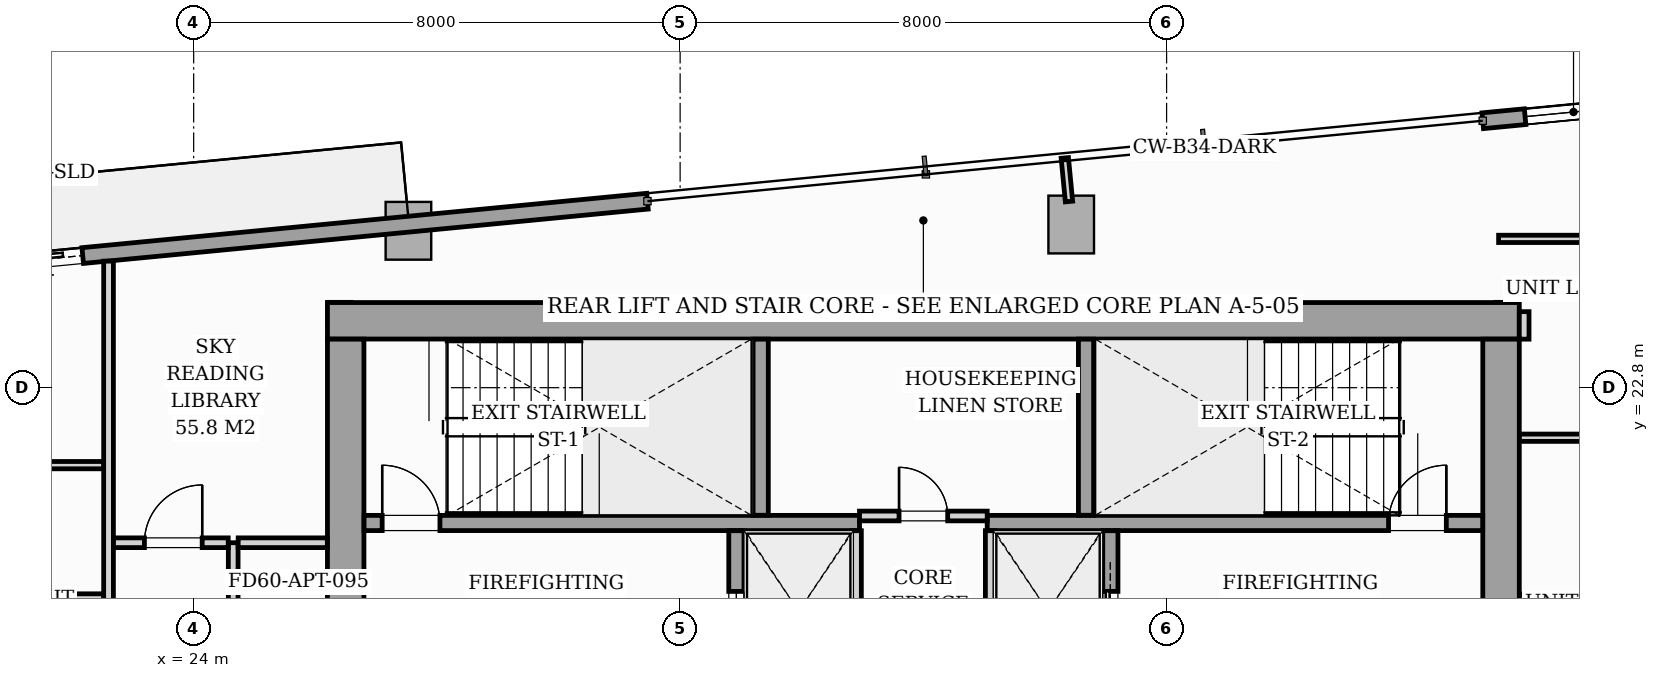
"""IFC4 building model, lengths in metres.
Left out: names, types, materials, properties, quantities, classifications, styles, units other than length and angle.
Written with IfcOpenShell. Run it as: python <this file> out.ifc"""

import sys

from ifc_helpers import new_model, si_unit, direction, frame, frame_2d, origin, origin_2d, place, context, subcontext, project, spatial, rectangle, i_section, extrude, source, transform, mapped, element, fill, save


model = new_model("IFC4")
c1 = context("Model", 3, precision=1e-05, world=origin(), true_north=direction((0.0, 1.0)))
c2 = subcontext(c1, "Body", "Model", "MODEL_VIEW")
j1 = project(units=[si_unit("LENGTHUNIT", "METRE"), si_unit("PLANEANGLEUNIT", "RADIAN")], contexts=[c1])
p1 = place(None, origin())
s1 = spatial("IfcSite", under=j1, at=p1, CompositionType="ELEMENT")
p2 = place(p1, origin())
s2 = spatial("IfcBuilding", under=s1, at=p2, CompositionType="ELEMENT")
p3 = place(p2, frame((0.0, 0.0, 176.2)))
s3 = spatial("IfcBuildingStorey", under=s2, at=p3, CompositionType="ELEMENT", Elevation=176.2)
m1 = source(origin(), c2, "Body", "SweptSolid", [
    extrude(i_section(OverallWidth=0.416, OverallDepth=0.446, WebThickness=0.039, FlangeThickness=0.063, FilletRadius=0.018, at=origin_2d()), origin(), (0.0, 0.0, 1.0), 3.196),
])
for number, where, z_axis, x_axis in (
    (1, (26.4, 24.0, 0.002), (0.0, 0.0, 1.0), (1.0, 0.0, 0.0)),
    (2, (33.12, 24.0, 0.002), (0.0, 0.0, 1.0), (1.0, 0.0, 0.0)),
    (3, (38.88, 24.0, 0.002), (0.0, 0.0, 1.0), (1.0, 0.0, 0.0)),
    (4, (45.6, 24.0, 0.002), (0.0, 0.0, 1.0), (1.0, 0.0, 0.0)),
):
    element("IfcColumn", number, at=place(p3, frame(where, z_axis=z_axis, x_axis=x_axis)), inside=s3, PredefinedType="PILASTER", context=c2, shape_type="MappedRepresentation", body=[
        mapped(m1, transform((0.0, 0.0, 0.0), scale=1.0)),
    ])
m2 = source(origin(), c2, "Body", "SweptSolid", [
    extrude(rectangle(XDim=0.75, YDim=0.95, at=origin_2d()), origin(), (0.0, 0.0, 1.0), 3.196),
])
for number, where, z_axis, x_axis in (
    (5, (27.532, 25.38, 0.002), (0.0, 0.0, 1.0), (0.995, 0.096, 0.0)),
    (6, (38.431, 25.483, 0.002), (0.0, 0.0, 1.0), (0.995, 0.096, 0.0)),
):
    element("IfcColumn", number, at=place(p3, frame(where, z_axis=z_axis, x_axis=x_axis)), inside=s3, PredefinedType="COLUMN", context=c2, shape_type="MappedRepresentation", body=[
        mapped(m2, transform((0.0, 0.0, 0.0), scale=1.0)),
    ])
p4 = place(p3, frame((15.437, 24.324, 0.0), z_axis=(0.0, 0.0, 1.0), x_axis=(0.995395627913, 0.095851676732, 0.0)))
e7 = element("IfcWall", 7, at=p4, inside=s3, PredefinedType="STANDARD", context=c2, shape_type="SweptSolid", body=[
    extrude(rectangle(XDim=16.1, YDim=0.26, at=frame_2d((8.05, 0.0))), origin(), (0.0, 0.0, 1.0), 2.94),
])
p5 = place(p4, frame((4.97, 0.0, 0.0)))
e8 = element("IfcOpeningElement", 8, at=p5, cuts=e7, PredefinedType="OPENING", context=c2, shape_type="SweptSolid", body=[
    extrude(rectangle(XDim=1.8, YDim=2.06, at=frame_2d((0.9, 1.03))), frame((0.0, 0.14, 0.0), z_axis=(0.0, -1.0, 0.0), x_axis=(1.0, 0.0, 0.0)), (0.0, 0.0, 1.0), 0.28),
])
p6 = place(p4, frame((2.05, 0.0, 0.65)))
e9 = element("IfcOpeningElement", 9, at=p6, cuts=e7, PredefinedType="OPENING", context=c2, shape_type="SweptSolid", body=[
    extrude(rectangle(XDim=1.6, YDim=1.5, at=frame_2d((0.8, 0.75))), frame((0.0, 0.14, 0.0), z_axis=(0.0, -1.0, 0.0), x_axis=(1.0, 0.0, 0.0)), (0.0, 0.0, 1.0), 0.28),
])
p7 = place(p3, frame((45.199, 27.19, 0.0), z_axis=(0.0, 0.0, 1.0), x_axis=(0.995397074604, 0.095836652014, 0.0)))
e10 = element("IfcWall", 10, at=p7, inside=s3, PredefinedType="STANDARD", context=c2, shape_type="SweptSolid", body=[
    extrude(rectangle(XDim=16.1, YDim=0.26, at=frame_2d((8.05, 0.0))), origin(), (0.0, 0.0, 1.0), 2.94),
])
p8 = place(p7, frame((10.13, 0.0, 0.0)))
e11 = element("IfcOpeningElement", 11, at=p8, cuts=e10, PredefinedType="OPENING", context=c2, shape_type="SweptSolid", body=[
    extrude(rectangle(XDim=1.8, YDim=2.06, at=frame_2d((0.9, 1.03))), frame((0.0, 0.14, 0.0), z_axis=(0.0, -1.0, 0.0), x_axis=(1.0, 0.0, 0.0)), (0.0, 0.0, 1.0), 0.28),
])
p9 = place(p7, frame((0.7, 0.0, 0.65)))
e12 = element("IfcOpeningElement", 12, at=p9, cuts=e10, PredefinedType="OPENING", context=c2, shape_type="SweptSolid", body=[
    extrude(rectangle(XDim=1.6, YDim=1.5, at=frame_2d((0.8, 0.75))), frame((0.0, 0.14, 0.0), z_axis=(0.0, -1.0, 0.0), x_axis=(1.0, 0.0, 0.0)), (0.0, 0.0, 1.0), 0.28),
])
p10 = place(p3, frame((26.2, 23.9, 0.0), z_axis=(0.0, 0.0, 1.0), x_axis=(1.0, 0.0, 0.0)))
e13 = element("IfcWall", 13, at=p10, inside=s3, PredefinedType="SHEAR", context=c2, shape_type="SweptSolid", body=[
    extrude(rectangle(XDim=19.6, YDim=0.6, at=frame_2d((9.8, 0.0))), origin(), (0.0, 0.0, 1.0), 3.2),
])
for number, where, z_axis, x_axis in (
    (14, (26.5, 17.802, 0.0), (0.0, 0.0, 1.0), (0.0, 1.0, 0.0)),
    (15, (45.5, 17.802, 0.0), (0.0, 0.0, 1.0), (0.0, 1.0, 0.0)),
):
    element("IfcWall", number, at=place(p3, frame(where, z_axis=z_axis, x_axis=x_axis)), inside=s3, PredefinedType="SHEAR", context=c2, shape_type="SweptSolid", body=[
        extrude(rectangle(XDim=5.796, YDim=0.6, at=frame_2d((2.898, 0.0))), origin(), (0.0, 0.0, 1.0), 3.2),
    ])
p11 = place(p3, frame((26.802, 20.575, 0.0), z_axis=(0.0, 0.0, 1.0), x_axis=(1.0, 0.0, 0.0)))
e16 = element("IfcWall", 16, at=p11, inside=s3, PredefinedType="SOLIDWALL", context=c2, shape_type="SweptSolid", body=[
    extrude(rectangle(XDim=8.148, YDim=0.25, at=frame_2d((4.074, 0.0))), origin(), (0.0, 0.0, 1.0), 3.2),
])
p12 = place(p11, frame((0.298, 0.0, 0.0)))
e17 = element("IfcOpeningElement", 17, at=p12, cuts=e16, PredefinedType="OPENING", context=c2, shape_type="SweptSolid", body=[
    extrude(rectangle(XDim=0.95, YDim=2.06, at=frame_2d((0.475, 1.03))), frame((0.0, 0.135, 0.0), z_axis=(0.0, -1.0, 0.0), x_axis=(1.0, 0.0, 0.0)), (0.0, 0.0, 1.0), 0.27),
])
p13 = place(p3, frame((37.05, 20.575, 0.0), z_axis=(0.0, 0.0, 1.0), x_axis=(1.0, 0.0, 0.0)))
e18 = element("IfcWall", 18, at=p13, inside=s3, PredefinedType="SOLIDWALL", context=c2, shape_type="SweptSolid", body=[
    extrude(rectangle(XDim=8.148, YDim=0.25, at=frame_2d((4.074, 0.0))), origin(), (0.0, 0.0, 1.0), 3.2),
])
p14 = place(p13, frame((6.6, 0.0, 0.0)))
e19 = element("IfcOpeningElement", 19, at=p14, cuts=e18, PredefinedType="OPENING", context=c2, shape_type="SweptSolid", body=[
    extrude(rectangle(XDim=0.95, YDim=2.06, at=frame_2d((0.475, 1.03))), frame((0.0, 0.135, 0.0), z_axis=(0.0, -1.0, 0.0), x_axis=(1.0, 0.0, 0.0)), (0.0, 0.0, 1.0), 0.27),
])
for number, where, z_axis, x_axis in (
    (20, (33.325, 20.702, 0.0), (0.0, 0.0, 1.0), (0.0, 1.0, 0.0)),
    (21, (38.675, 20.702, 0.0), (0.0, 0.0, 1.0), (0.0, 1.0, 0.0)),
):
    element("IfcWall", number, at=place(p3, frame(where, z_axis=z_axis, x_axis=x_axis)), inside=s3, PredefinedType="SOLIDWALL", context=c2, shape_type="SweptSolid", body=[
        extrude(rectangle(XDim=2.896, YDim=0.25, at=frame_2d((1.448, 0.0))), origin(), (0.0, 0.0, 1.0), 3.2),
    ])
p15 = place(p3, frame((32.925, 17.802, 0.0), z_axis=(0.0, 0.0, 1.0), x_axis=(0.0, 1.0, 0.0)))
e22 = element("IfcWall", 22, at=p15, inside=s3, PredefinedType="SOLIDWALL", context=c2, shape_type="SweptSolid", body=[
    extrude(rectangle(XDim=2.646, YDim=0.25, at=frame_2d((1.323, 0.0))), origin(), (0.0, 0.0, 1.0), 3.2),
])
p16 = place(p15, frame((0.548, 0.0, 0.0)))
e23 = element("IfcOpeningElement", 23, at=p16, cuts=e22, PredefinedType="OPENING", context=c2, shape_type="SweptSolid", body=[
    extrude(rectangle(XDim=1.1, YDim=2.08, at=frame_2d((0.55, 1.04))), frame((0.0, 0.135, 0.0), z_axis=(0.0, -1.0, 0.0), x_axis=(1.0, 0.0, 0.0)), (0.0, 0.0, 1.0), 0.27),
])
for number, where, z_axis, x_axis in (
    (24, (34.9, 17.802, 0.0), (0.0, 0.0, 1.0), (0.0, 1.0, 0.0)),
    (25, (37.1, 17.802, 0.0), (0.0, 0.0, 1.0), (0.0, 1.0, 0.0)),
):
    element("IfcWall", number, at=place(p3, frame(where, z_axis=z_axis, x_axis=x_axis)), inside=s3, PredefinedType="PARTITIONING", context=c2, shape_type="SweptSolid", body=[
        extrude(rectangle(XDim=2.646, YDim=0.16, at=frame_2d((1.323, 0.0))), origin(), (0.0, 0.0, 1.0), 2.94),
    ])
p17 = place(p3, frame((39.075, 17.802, 0.0), z_axis=(0.0, 0.0, 1.0), x_axis=(0.0, 1.0, 0.0)))
e26 = element("IfcWall", 26, at=p17, inside=s3, PredefinedType="SOLIDWALL", context=c2, shape_type="SweptSolid", body=[
    extrude(rectangle(XDim=2.646, YDim=0.25, at=frame_2d((1.323, 0.0))), origin(), (0.0, 0.0, 1.0), 3.2),
])
p18 = place(p17, frame((0.548, 0.0, 0.0)))
e27 = element("IfcOpeningElement", 27, at=p18, cuts=e26, PredefinedType="OPENING", context=c2, shape_type="SweptSolid", body=[
    extrude(rectangle(XDim=1.1, YDim=2.08, at=frame_2d((0.55, 1.04))), frame((0.0, 0.135, 0.0), z_axis=(0.0, -1.0, 0.0), x_axis=(1.0, 0.0, 0.0)), (0.0, 0.0, 1.0), 0.27),
])
p19 = place(p3, frame((34.95, 20.69, 0.0), z_axis=(0.0, 0.0, 1.0), x_axis=(1.0, 0.0, 0.0)))
e28 = element("IfcWall", 28, at=p19, inside=s3, PredefinedType="PARTITIONING", context=c2, shape_type="SweptSolid", body=[
    extrude(rectangle(XDim=2.1, YDim=0.16, at=frame_2d((1.05, 0.0))), origin(), (0.0, 0.0, 1.0), 2.94),
])
p20 = place(p19, frame((0.65, 0.0, 0.0)))
e29 = element("IfcOpeningElement", 29, at=p20, cuts=e28, PredefinedType="OPENING", context=c2, shape_type="SweptSolid", body=[
    extrude(rectangle(XDim=0.8, YDim=2.05, at=frame_2d((0.4, 1.025))), frame((0.0, 0.09, 0.0), z_axis=(0.0, -1.0, 0.0), x_axis=(1.0, 0.0, 0.0)), (0.0, 0.0, 1.0), 0.18),
])
p21 = place(p3, frame((22.6, 13.232, 0.0), z_axis=(0.0, 0.0, 1.0), x_axis=(0.0, 1.0, 0.0)))
e30 = element("IfcWall", 30, at=p21, inside=s3, PredefinedType="PARTITIONING", context=c2, shape_type="SweptSolid", body=[
    extrude(rectangle(XDim=11.649, YDim=0.16, at=frame_2d((5.824, 0.0))), origin(), (0.0, 0.0, 1.0), 2.94),
])
p22 = place(p21, frame((0.493, 0.0, 0.0)))
e31 = element("IfcOpeningElement", 31, at=p22, cuts=e30, PredefinedType="OPENING", context=c2, shape_type="SweptSolid", body=[
    extrude(rectangle(XDim=0.95, YDim=2.06, at=frame_2d((0.475, 1.03))), frame((0.0, 0.09, 0.0), z_axis=(0.0, -1.0, 0.0), x_axis=(1.0, 0.0, 0.0)), (0.0, 0.0, 1.0), 0.18),
])
p23 = place(p3, frame((45.88, 23.598, 0.0), z_axis=(0.0, 0.0, 1.0), x_axis=(0.0, 1.0, 0.0)))
e32 = element("IfcWall", 32, at=p23, inside=s3, PredefinedType="PARTITIONING", context=c2, shape_type="SweptSolid", body=[
    extrude(rectangle(XDim=0.452, YDim=0.16, at=frame_2d((0.226, 0.0))), origin(), (0.0, 0.0, 1.0), 2.94),
])
p24 = place(p3, frame((20.262, 19.35, 0.0), z_axis=(0.0, 0.0, 1.0), x_axis=(1.0, 0.0, 0.0)))
e33 = element("IfcWall", 33, at=p24, inside=s3, PredefinedType="PARTITIONING", context=c2, shape_type="SweptSolid", body=[
    extrude(rectangle(XDim=2.256, YDim=0.12, at=frame_2d((1.128, 0.0))), origin(), (0.0, 0.0, 1.0), 2.94),
])
p25 = place(p3, frame((14.53, 21.526, 0.0), z_axis=(0.0, 0.0, 1.0), x_axis=(1.0, 0.0, 0.0)))
e34 = element("IfcWall", 34, at=p25, inside=s3, PredefinedType="PARTITIONING", context=c2, shape_type="SweptSolid", body=[
    extrude(rectangle(XDim=7.988, YDim=0.12, at=frame_2d((3.994, 0.0))), origin(), (0.0, 0.0, 1.0), 2.94),
])
p26 = place(p25, frame((2.925, 0.0, 0.0)))
e35 = element("IfcOpeningElement", 35, at=p26, cuts=e34, PredefinedType="OPENING", context=c2, shape_type="SweptSolid", body=[
    extrude(rectangle(XDim=0.85, YDim=2.05, at=frame_2d((0.425, 1.025))), frame((0.0, 0.07, 0.0), z_axis=(0.0, -1.0, 0.0), x_axis=(1.0, 0.0, 0.0)), (0.0, 0.0, 1.0), 0.14),
])
p27 = place(p3, frame((45.802, 19.35, 0.0), z_axis=(0.0, 0.0, 1.0), x_axis=(1.0, 0.0, 0.0)))
e36 = element("IfcWall", 36, at=p27, inside=s3, PredefinedType="PARTITIONING", context=c2, shape_type="SweptSolid", body=[
    extrude(rectangle(XDim=2.416, YDim=0.12, at=frame_2d((1.208, 0.0))), origin(), (0.0, 0.0, 1.0), 2.94),
])
p28 = place(p3, frame((45.46, 25.247, 0.0), z_axis=(0.0, 0.0, 1.0), x_axis=(1.0, 0.0, 0.0)))
e37 = element("IfcWall", 37, at=p28, inside=s3, PredefinedType="PARTITIONING", context=c2, shape_type="SweptSolid", body=[
    extrude(rectangle(XDim=9.461, YDim=0.12, at=frame_2d((4.73, 0.0))), origin(), (0.0, 0.0, 1.0), 2.94),
])
p29 = place(p28, frame((4.826, 0.0, 0.0)))
e38 = element("IfcOpeningElement", 38, at=p29, cuts=e37, PredefinedType="OPENING", context=c2, shape_type="SweptSolid", body=[
    extrude(rectangle(XDim=0.85, YDim=2.05, at=frame_2d((0.425, 1.025))), frame((0.0, 0.07, 0.0), z_axis=(0.0, -1.0, 0.0), x_axis=(1.0, 0.0, 0.0)), (0.0, 0.0, 1.0), 0.14),
])
p30 = place(p3, frame((45.802, 21.977, 0.0), z_axis=(0.0, 0.0, 1.0), x_axis=(1.0, 0.0, 0.0)))
e39 = element("IfcWall", 39, at=p30, inside=s3, PredefinedType="PARTITIONING", context=c2, shape_type="SweptSolid", body=[
    extrude(rectangle(XDim=18.504, YDim=0.12, at=frame_2d((9.252, 0.0))), origin(), (0.0, 0.0, 1.0), 2.94),
])
p31 = place(p30, frame((8.913, 0.0, 0.0)))
e40 = element("IfcOpeningElement", 40, at=p31, cuts=e39, PredefinedType="OPENING", context=c2, shape_type="SweptSolid", body=[
    extrude(rectangle(XDim=0.85, YDim=2.05, at=frame_2d((0.425, 1.025))), frame((0.0, 0.07, 0.0), z_axis=(0.0, -1.0, 0.0), x_axis=(1.0, 0.0, 0.0)), (0.0, 0.0, 1.0), 0.14),
])
p32 = place(p3, frame((24.65, 14.66, 0.0), z_axis=(0.0, 0.0, 1.0), x_axis=(0.0, 1.0, 0.0)))
e41 = element("IfcWall", 41, at=p32, inside=s3, PredefinedType="PARTITIONING", context=c2, shape_type="SweptSolid", body=[
    extrude(rectangle(XDim=5.59, YDim=0.16, at=frame_2d((2.795, 0.0))), origin(), (0.0, 0.0, 1.0), 2.94),
])
p33 = place(p32, frame((3.54, 0.0, 0.0)))
e42 = element("IfcOpeningElement", 42, at=p33, cuts=e41, PredefinedType="OPENING", context=c2, shape_type="SweptSolid", body=[
    extrude(rectangle(XDim=0.95, YDim=2.06, at=frame_2d((0.475, 1.03))), frame((0.0, 0.09, 0.0), z_axis=(0.0, -1.0, 0.0), x_axis=(1.0, 0.0, 0.0)), (0.0, 0.0, 1.0), 0.18),
])
p34 = place(p3, frame((22.682, 20.25, 0.0), z_axis=(0.0, 0.0, 1.0), x_axis=(1.0, 0.0, 0.0)))
e43 = element("IfcWall", 43, at=p34, inside=s3, PredefinedType="PARTITIONING", context=c2, shape_type="SweptSolid", body=[
    extrude(rectangle(XDim=1.886, YDim=0.16, at=frame_2d((0.943, 0.0))), origin(), (0.0, 0.0, 1.0), 2.94),
])
p35 = place(p34, frame((0.508, 0.0, 0.0)))
e44 = element("IfcOpeningElement", 44, at=p35, cuts=e43, PredefinedType="OPENING", context=c2, shape_type="SweptSolid", body=[
    extrude(rectangle(XDim=0.95, YDim=2.06, at=frame_2d((0.475, 1.03))), frame((0.0, 0.09, 0.0), z_axis=(0.0, -1.0, 0.0), x_axis=(1.0, 0.0, 0.0)), (0.0, 0.0, 1.0), 0.18),
])
p36 = place(p3, frame((24.732, 20.25, 0.0), z_axis=(0.0, 0.0, 1.0), x_axis=(1.0, 0.0, 0.0)))
e45 = element("IfcWall", 45, at=p36, inside=s3, PredefinedType="PARTITIONING", context=c2, shape_type="SweptSolid", body=[
    extrude(rectangle(XDim=1.466, YDim=0.16, at=frame_2d((0.733, 0.0))), origin(), (0.0, 0.0, 1.0), 2.94),
])
p37 = place(p3, frame((38.395, 25.861, 0.0), z_axis=(0.0, 0.0, 1.0), x_axis=(-0.095977354523, 0.995383517755, 0.0)))
e46 = element("IfcWall", 46, at=p37, inside=s3, PredefinedType="PARTITIONING", context=c2, shape_type="SweptSolid", body=[
    extrude(rectangle(XDim=0.72, YDim=0.12, at=frame_2d((0.36, 0.0))), origin(), (0.0, 0.0, 1.0), 2.94),
])
m3 = source(origin(), c2, "Body", "SweptSolid", [
    extrude(rectangle(XDim=1.8, YDim=2.06, at=frame_2d((0.9, 1.03))), frame((0.0, 0.025, 0.0), z_axis=(0.0, -1.0, 0.0), x_axis=(1.0, 0.0, 0.0)), (0.0, 0.0, 1.0), 0.05),
])
p38 = place(p5, origin())
e47 = element("IfcDoor", 47, at=p38, inside=s3, OperationType="SLIDING_TO_LEFT", PredefinedType="DOOR", context=c2, shape_type="MappedRepresentation", body=[
    mapped(m3, transform((0.0, 0.0, 0.0), scale=1.0)),
])
fill(e8, e47)
m4 = source(origin(), c2, "Body", "SweptSolid", [
    extrude(rectangle(XDim=1.6, YDim=1.5, at=frame_2d((0.8, 0.75))), frame((0.0, 0.03, 0.0), z_axis=(0.0, -1.0, 0.0), x_axis=(1.0, 0.0, 0.0)), (0.0, 0.0, 1.0), 0.06),
])
p39 = place(p9, origin())
e48 = element("IfcWindow", 48, at=p39, inside=s3, PartitioningType="SINGLE_PANEL", PredefinedType="WINDOW", context=c2, shape_type="MappedRepresentation", body=[
    mapped(m4, transform((0.0, 0.0, 0.0), scale=1.0)),
])
fill(e12, e48)
m5 = source(origin(), c2, "Body", "SweptSolid", [
    extrude(rectangle(XDim=0.95, YDim=2.06, at=frame_2d((0.475, 1.03))), frame((0.0, 0.025, 0.0), z_axis=(0.0, -1.0, 0.0), x_axis=(1.0, 0.0, 0.0)), (0.0, 0.0, 1.0), 0.05),
])
p40 = place(p12, origin())
e49 = element("IfcDoor", 49, at=p40, inside=s3, OperationType="SINGLE_SWING_LEFT", PredefinedType="DOOR", context=c2, shape_type="MappedRepresentation", body=[
    mapped(m5, transform((0.0, 0.0, 0.0), scale=1.0)),
])
fill(e17, e49)
p41 = place(p14, origin())
e50 = element("IfcDoor", 50, at=p41, inside=s3, OperationType="SINGLE_SWING_RIGHT", PredefinedType="DOOR", context=c2, shape_type="MappedRepresentation", body=[
    mapped(m5, transform((0.0, 0.0, 0.0), scale=1.0)),
])
fill(e19, e50)
m6 = source(origin(), c2, "Body", "SweptSolid", [
    extrude(rectangle(XDim=1.1, YDim=2.08, at=frame_2d((0.55, 1.04))), frame((0.0, 0.025, 0.0), z_axis=(0.0, -1.0, 0.0), x_axis=(1.0, 0.0, 0.0)), (0.0, 0.0, 1.0), 0.05),
])
p42 = place(p16, origin())
e51 = element("IfcDoor", 51, at=p42, inside=s3, OperationType="SLIDING_TO_LEFT", PredefinedType="DOOR", context=c2, shape_type="MappedRepresentation", body=[
    mapped(m6, transform((0.0, 0.0, 0.0), scale=1.0)),
])
fill(e23, e51)
p43 = place(p18, origin())
e52 = element("IfcDoor", 52, at=p43, inside=s3, OperationType="SLIDING_TO_RIGHT", PredefinedType="DOOR", context=c2, shape_type="MappedRepresentation", body=[
    mapped(m6, transform((0.0, 0.0, 0.0), scale=1.0)),
])
fill(e27, e52)
m7 = source(origin(), c2, "Body", "SweptSolid", [
    extrude(rectangle(XDim=0.8, YDim=2.05, at=frame_2d((0.4, 1.025))), frame((0.0, 0.025, 0.0), z_axis=(0.0, -1.0, 0.0), x_axis=(1.0, 0.0, 0.0)), (0.0, 0.0, 1.0), 0.05),
])
p44 = place(p20, origin())
e53 = element("IfcDoor", 53, at=p44, inside=s3, OperationType="SINGLE_SWING_LEFT", PredefinedType="DOOR", context=c2, shape_type="MappedRepresentation", body=[
    mapped(m7, transform((0.0, 0.0, 0.0), scale=1.0)),
])
fill(e29, e53)
m8 = source(origin(), c2, "Body", "SweptSolid", [
    extrude(rectangle(XDim=0.95, YDim=2.06, at=frame_2d((0.475, 1.03))), frame((0.0, 0.025, 0.0), z_axis=(0.0, -1.0, 0.0), x_axis=(1.0, 0.0, 0.0)), (0.0, 0.0, 1.0), 0.05),
])
p45 = place(p35, origin())
e54 = element("IfcDoor", 54, at=p45, inside=s3, OperationType="SINGLE_SWING_RIGHT", PredefinedType="DOOR", context=c2, shape_type="MappedRepresentation", body=[
    mapped(m8, transform((0.0, 0.0, 0.0), scale=1.0)),
])
fill(e44, e54)
save(model, sys.argv[1])
